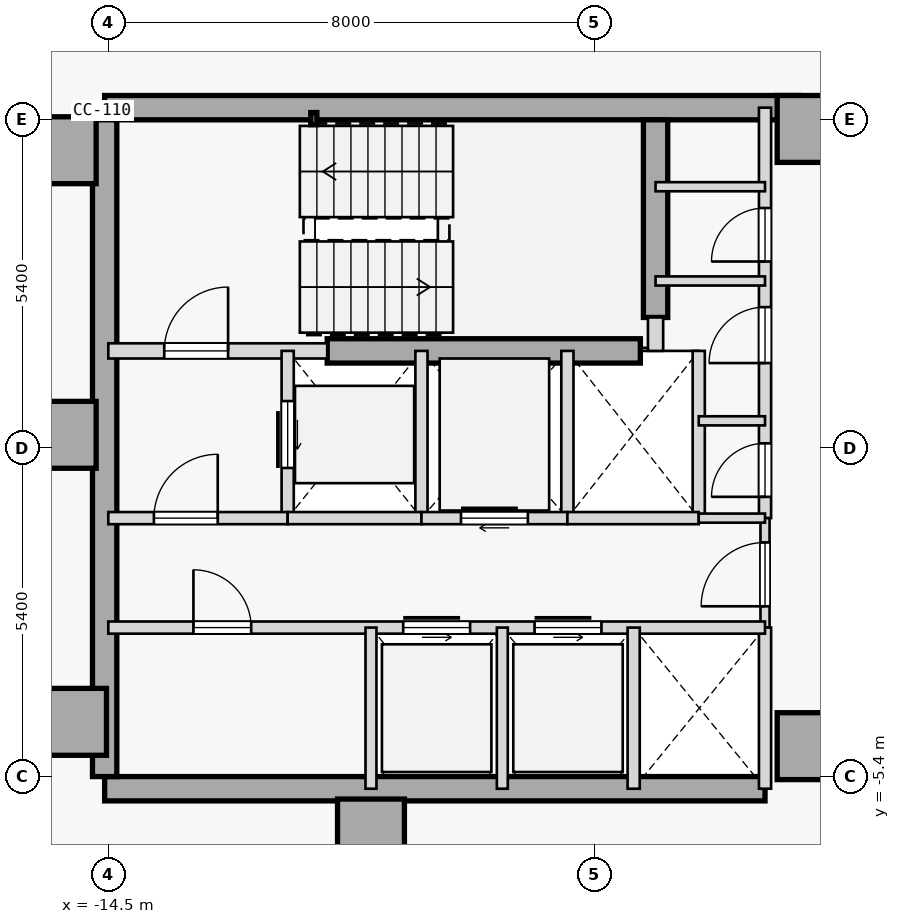
"""IFC4 building model, lengths in metres.
Left out: names, types, materials, properties, quantities, classifications, styles, units other than length and angle.
Written with IfcOpenShell. Run it as: python <this file> out.ifc"""

import sys

from ifc_helpers import new_model, si_unit, direction, frame, frame_2d, origin, origin_2d, place, context, subcontext, project, spatial, rectangle, hollow_rectangle, extrude, element, fill, save


model = new_model("IFC4")
c1 = context("Model", 3, precision=1e-05, world=origin(), true_north=direction((0.0, 1.0)))
c2 = subcontext(c1, "Body", "Model", "MODEL_VIEW")
j1 = project(units=[si_unit("LENGTHUNIT", "METRE"), si_unit("PLANEANGLEUNIT", "RADIAN")], contexts=[c1])
p1 = place(None, origin())
s1 = spatial("IfcSite", under=j1, at=p1, CompositionType="ELEMENT")
p2 = place(p1, origin())
s2 = spatial("IfcBuilding", under=s1, at=p2, CompositionType="ELEMENT")
p3 = place(p2, frame((0.0, 0.0, 192.2)))
s3 = spatial("IfcBuildingStorey", under=s2, at=p3, CompositionType="ELEMENT", Elevation=192.2)
for number, where, z_axis, x_axis in (
    (1, (-15.25, 4.9, 0.0), (0.0, 0.0, 1.0), (1.0, 0.0, 0.0)),
    (2, (-15.25, 0.22, 0.0), (0.0, 0.0, 1.0), (1.0, 0.0, 0.0)),
    (3, (-15.08, -4.5, 0.0), (0.0, 0.0, 1.0), (1.0, 0.0, 0.0)),
    (4, (-10.18, -6.32, 0.0), (0.0, 0.0, 1.0), (1.0, 0.0, 0.0)),
    (5, (-2.95, -4.9, 0.0), (0.0, 0.0, 1.0), (1.0, 0.0, 0.0)),
    (6, (-2.95, 5.25, 0.0), (0.0, 0.0, 1.0), (1.0, 0.0, 0.0)),
):
    element("IfcColumn", number, at=place(p3, frame(where, z_axis=z_axis, x_axis=x_axis)), inside=s3, PredefinedType="COLUMN", context=c2, shape_type="SweptSolid", body=[
        extrude(rectangle(XDim=1.1, YDim=1.1, at=origin_2d()), origin(), (0.0, 0.0, 1.0), 3.4),
    ])
p4 = place(p3, frame((-14.56, 5.6, 0.0), z_axis=(0.0, 0.0, 1.0), x_axis=(1.0, 0.0, 0.0)))
e7 = element("IfcWall", 7, at=p4, inside=s3, PredefinedType="SHEAR", context=c2, shape_type="SweptSolid", body=[
    extrude(rectangle(XDim=11.41, YDim=0.4, at=frame_2d((5.705, 0.0))), origin(), (0.0, 0.0, 1.0), 3.175),
])
p5 = place(p3, frame((-14.56, -5.6, 0.0), z_axis=(0.0, 0.0, 1.0), x_axis=(1.0, 0.0, 0.0)))
e8 = element("IfcWall", 8, at=p5, inside=s3, PredefinedType="SHEAR", context=c2, shape_type="SweptSolid", body=[
    extrude(rectangle(XDim=10.86, YDim=0.4, at=frame_2d((5.43, 0.0))), origin(), (0.0, 0.0, 1.0), 3.175),
])
p6 = place(p3, frame((-14.56, -5.4, 0.0), z_axis=(0.0, 0.0, 1.0), x_axis=(0.0, 1.0, 0.0)))
e9 = element("IfcWall", 9, at=p6, inside=s3, PredefinedType="SHEAR", context=c2, shape_type="SweptSolid", body=[
    extrude(rectangle(XDim=10.8, YDim=0.4, at=frame_2d((5.4, 0.0))), origin(), (0.0, 0.0, 1.0), 3.175),
])
p7 = place(p3, frame((-5.5, 2.15, 0.0), z_axis=(0.0, 0.0, 1.0), x_axis=(0.0, 1.0, 0.0)))
e10 = element("IfcWall", 10, at=p7, inside=s3, PredefinedType="SHEAR", context=c2, shape_type="SweptSolid", body=[
    extrude(rectangle(XDim=3.25, YDim=0.4, at=frame_2d((1.625, 0.0))), origin(), (0.0, 0.0, 1.0), 3.175),
])
p8 = place(p3, frame((-10.9, 1.6, 0.0), z_axis=(0.0, 0.0, 1.0), x_axis=(1.0, 0.0, 0.0)))
e11 = element("IfcWall", 11, at=p8, inside=s3, PredefinedType="SHEAR", context=c2, shape_type="SweptSolid", body=[
    extrude(rectangle(XDim=5.15, YDim=0.4, at=frame_2d((2.575, 0.0))), origin(), (0.0, 0.0, 1.0), 3.175),
])
p9 = place(p3, frame((-11.12, 5.42, 0.0), z_axis=(0.0, 0.0, 1.0), x_axis=(1.0, 0.0, 0.0)))
e12 = element("IfcColumn", 12, at=p9, inside=s3, PredefinedType="COLUMN", context=c2, shape_type="SweptSolid", body=[
    extrude(hollow_rectangle(XDim=0.1, YDim=0.2, WallThickness=0.008, at=origin_2d()), origin(), (0.0, 0.0, 1.0), 3.4),
])
p10 = place(p3, frame((-14.5, 1.6, 0.0), z_axis=(0.0, 0.0, 1.0), x_axis=(1.0, 0.0, 0.0)))
e13 = element("IfcWall", 13, at=p10, inside=s3, PredefinedType="STANDARD", context=c2, shape_type="SweptSolid", body=[
    extrude(rectangle(XDim=3.6, YDim=0.25, at=frame_2d((1.8, 0.0))), origin(), (0.0, 0.0, 1.0), 3.175),
])
p11 = place(p10, frame((0.92, 0.0, 0.0)))
e14 = element("IfcOpeningElement", 14, at=p11, cuts=e13, PredefinedType="OPENING", context=c2, shape_type="SweptSolid", body=[
    extrude(rectangle(XDim=1.05, YDim=2.15, at=frame_2d((0.525, 1.075))), frame((0.0, 0.135, 0.0), z_axis=(0.0, -1.0, 0.0), x_axis=(1.0, 0.0, 0.0)), (0.0, 0.0, 1.0), 0.27),
])
p12 = place(p3, frame((-5.5, 1.6, 0.0), z_axis=(0.0, 0.0, 1.0), x_axis=(0.0, 1.0, 0.0)))
e15 = element("IfcWall", 15, at=p12, inside=s3, PredefinedType="STANDARD", context=c2, shape_type="SweptSolid", body=[
    extrude(rectangle(XDim=0.55, YDim=0.25, at=frame_2d((0.275, 0.0))), origin(), (0.0, 0.0, 1.0), 3.175),
])
p13 = place(p3, frame((-3.7, -1.15, 0.0), z_axis=(0.0, 0.0, 1.0), x_axis=(0.0, 1.0, 0.0)))
e16 = element("IfcWall", 16, at=p13, inside=s3, PredefinedType="STANDARD", context=c2, shape_type="SweptSolid", body=[
    extrude(rectangle(XDim=6.75, YDim=0.2, at=frame_2d((3.375, 0.0))), origin(), (0.0, 0.0, 1.0), 3.175),
])
p14 = place(p13, frame((0.35, 0.0, 0.0)))
e17 = element("IfcOpeningElement", 17, at=p14, cuts=e16, PredefinedType="OPENING", context=c2, shape_type="SweptSolid", body=[
    extrude(rectangle(XDim=0.88, YDim=2.15, at=frame_2d((0.44, 1.075))), frame((0.0, 0.11, 0.0), z_axis=(0.0, -1.0, 0.0), x_axis=(1.0, 0.0, 0.0)), (0.0, 0.0, 1.0), 0.22),
])
p15 = place(p13, frame((2.55, 0.0, 0.0)))
e18 = element("IfcOpeningElement", 18, at=p15, cuts=e16, PredefinedType="OPENING", context=c2, shape_type="SweptSolid", body=[
    extrude(rectangle(XDim=0.92, YDim=2.15, at=frame_2d((0.46, 1.075))), frame((0.0, 0.11, 0.0), z_axis=(0.0, -1.0, 0.0), x_axis=(1.0, 0.0, 0.0)), (0.0, 0.0, 1.0), 0.22),
])
p16 = place(p13, frame((4.22, 0.0, 0.0)))
e19 = element("IfcOpeningElement", 19, at=p16, cuts=e16, PredefinedType="OPENING", context=c2, shape_type="SweptSolid", body=[
    extrude(rectangle(XDim=0.88, YDim=2.15, at=frame_2d((0.44, 1.075))), frame((0.0, 0.11, 0.0), z_axis=(0.0, -1.0, 0.0), x_axis=(1.0, 0.0, 0.0)), (0.0, 0.0, 1.0), 0.22),
])
p17 = place(p3, frame((-3.7, -2.95, 0.0), z_axis=(0.0, 0.0, 1.0), x_axis=(0.0, 1.0, 0.0)))
e20 = element("IfcWall", 20, at=p17, inside=s3, PredefinedType="PARTITIONING", context=c2, shape_type="SweptSolid", body=[
    extrude(rectangle(XDim=1.8, YDim=0.15, at=frame_2d((0.9, 0.0))), origin(), (0.0, 0.0, 1.0), 3.175),
])
p18 = place(p17, frame((0.35, 0.0, 0.0)))
e21 = element("IfcOpeningElement", 21, at=p18, cuts=e20, PredefinedType="OPENING", context=c2, shape_type="SweptSolid", body=[
    extrude(rectangle(XDim=1.05, YDim=2.18, at=frame_2d((0.525, 1.09))), frame((0.0, 0.085, 0.0), z_axis=(0.0, -1.0, 0.0), x_axis=(1.0, 0.0, 0.0)), (0.0, 0.0, 1.0), 0.17),
])
p19 = place(p3, frame((-3.7, -5.6, 0.0), z_axis=(0.0, 0.0, 1.0), x_axis=(0.0, 1.0, 0.0)))
e22 = element("IfcWall", 22, at=p19, inside=s3, PredefinedType="STANDARD", context=c2, shape_type="SweptSolid", body=[
    extrude(rectangle(XDim=2.65, YDim=0.2, at=frame_2d((1.325, 0.0))), origin(), (0.0, 0.0, 1.0), 3.175),
])
p20 = place(p3, frame((-11.55, -1.15, 0.0), z_axis=(0.0, 0.0, 1.0), x_axis=(0.0, 1.0, 0.0)))
e23 = element("IfcWall", 23, at=p20, inside=s3, PredefinedType="STANDARD", context=c2, shape_type="SweptSolid", body=[
    extrude(rectangle(XDim=2.75, YDim=0.2, at=frame_2d((1.375, 0.0))), origin(), (0.0, 0.0, 1.0), 3.175),
])
p21 = place(p20, frame((0.825, 0.0, 0.0)))
e24 = element("IfcOpeningElement", 24, at=p21, cuts=e23, PredefinedType="OPENING", context=c2, shape_type="SweptSolid", body=[
    extrude(rectangle(XDim=1.1, YDim=2.15, at=frame_2d((0.55, 1.075))), frame((0.0, 0.11, 0.0), z_axis=(0.0, -1.0, 0.0), x_axis=(1.0, 0.0, 0.0)), (0.0, 0.0, 1.0), 0.22),
])
p22 = place(p3, frame((-9.35, -1.15, 0.0), z_axis=(0.0, 0.0, 1.0), x_axis=(0.0, 1.0, 0.0)))
e25 = element("IfcWall", 25, at=p22, inside=s3, PredefinedType="STANDARD", context=c2, shape_type="SweptSolid", body=[
    extrude(rectangle(XDim=2.75, YDim=0.2, at=frame_2d((1.375, 0.0))), origin(), (0.0, 0.0, 1.0), 3.175),
])
p23 = place(p3, frame((-14.5, -1.15, 0.0), z_axis=(0.0, 0.0, 1.0), x_axis=(1.0, 0.0, 0.0)))
e26 = element("IfcWall", 26, at=p23, inside=s3, PredefinedType="STANDARD", context=c2, shape_type="SweptSolid", body=[
    extrude(rectangle(XDim=2.95, YDim=0.2, at=frame_2d((1.475, 0.0))), origin(), (0.0, 0.0, 1.0), 3.175),
])
p24 = place(p23, frame((0.75, 0.0, 0.0)))
e27 = element("IfcOpeningElement", 27, at=p24, cuts=e26, PredefinedType="OPENING", context=c2, shape_type="SweptSolid", body=[
    extrude(rectangle(XDim=1.05, YDim=2.18, at=frame_2d((0.525, 1.09))), frame((0.0, 0.11, 0.0), z_axis=(0.0, -1.0, 0.0), x_axis=(1.0, 0.0, 0.0)), (0.0, 0.0, 1.0), 0.22),
])
p25 = place(p3, frame((-11.55, -1.15, 0.0), z_axis=(0.0, 0.0, 1.0), x_axis=(1.0, 0.0, 0.0)))
e28 = element("IfcWall", 28, at=p25, inside=s3, PredefinedType="STANDARD", context=c2, shape_type="SweptSolid", body=[
    extrude(rectangle(XDim=2.2, YDim=0.2, at=frame_2d((1.1, 0.0))), origin(), (0.0, 0.0, 1.0), 3.175),
])
p26 = place(p3, frame((-6.95, -1.15, 0.0), z_axis=(0.0, 0.0, 1.0), x_axis=(0.0, 1.0, 0.0)))
e29 = element("IfcWall", 29, at=p26, inside=s3, PredefinedType="STANDARD", context=c2, shape_type="SweptSolid", body=[
    extrude(rectangle(XDim=2.75, YDim=0.2, at=frame_2d((1.375, 0.0))), origin(), (0.0, 0.0, 1.0), 3.175),
])
p27 = place(p3, frame((-9.35, -1.15, 0.0), z_axis=(0.0, 0.0, 1.0), x_axis=(1.0, 0.0, 0.0)))
e30 = element("IfcWall", 30, at=p27, inside=s3, PredefinedType="STANDARD", context=c2, shape_type="SweptSolid", body=[
    extrude(rectangle(XDim=2.4, YDim=0.2, at=frame_2d((1.2, 0.0))), origin(), (0.0, 0.0, 1.0), 3.175),
])
p28 = place(p27, frame((0.65, 0.0, 0.0)))
e31 = element("IfcOpeningElement", 31, at=p28, cuts=e30, PredefinedType="OPENING", context=c2, shape_type="SweptSolid", body=[
    extrude(rectangle(XDim=1.1, YDim=2.15, at=frame_2d((0.55, 1.075))), frame((0.0, 0.11, 0.0), z_axis=(0.0, -1.0, 0.0), x_axis=(1.0, 0.0, 0.0)), (0.0, 0.0, 1.0), 0.22),
])
p29 = place(p3, frame((-4.79, -1.15, 0.0), z_axis=(0.0, 0.0, 1.0), x_axis=(0.0, 1.0, 0.0)))
e32 = element("IfcWall", 32, at=p29, inside=s3, PredefinedType="STANDARD", context=c2, shape_type="SweptSolid", body=[
    extrude(rectangle(XDim=2.75, YDim=0.2, at=frame_2d((1.375, 0.0))), origin(), (0.0, 0.0, 1.0), 3.175),
])
p30 = place(p3, frame((-6.95, -1.15, 0.0), z_axis=(0.0, 0.0, 1.0), x_axis=(1.0, 0.0, 0.0)))
e33 = element("IfcWall", 33, at=p30, inside=s3, PredefinedType="STANDARD", context=c2, shape_type="SweptSolid", body=[
    extrude(rectangle(XDim=2.16, YDim=0.2, at=frame_2d((1.08, 0.0))), origin(), (0.0, 0.0, 1.0), 3.175),
])
p31 = place(p3, frame((-4.79, -1.15, 0.0), z_axis=(0.0, 0.0, 1.0), x_axis=(1.0, 0.0, 0.0)))
e34 = element("IfcWall", 34, at=p31, inside=s3, PredefinedType="PARTITIONING", context=c2, shape_type="SweptSolid", body=[
    extrude(rectangle(XDim=1.09, YDim=0.15, at=frame_2d((0.545, 0.0))), origin(), (0.0, 0.0, 1.0), 3.175),
])
p32 = place(p3, frame((-14.5, -2.95, 0.0), z_axis=(0.0, 0.0, 1.0), x_axis=(1.0, 0.0, 0.0)))
e35 = element("IfcWall", 35, at=p32, inside=s3, PredefinedType="STANDARD", context=c2, shape_type="SweptSolid", body=[
    extrude(rectangle(XDim=10.8, YDim=0.2, at=frame_2d((5.4, 0.0))), origin(), (0.0, 0.0, 1.0), 3.175),
])
p33 = place(p32, frame((4.85, 0.0, 0.0)))
e36 = element("IfcOpeningElement", 36, at=p33, cuts=e35, PredefinedType="OPENING", context=c2, shape_type="SweptSolid", body=[
    extrude(rectangle(XDim=1.1, YDim=2.15, at=frame_2d((0.55, 1.075))), frame((0.0, 0.11, 0.0), z_axis=(0.0, -1.0, 0.0), x_axis=(1.0, 0.0, 0.0)), (0.0, 0.0, 1.0), 0.22),
])
p34 = place(p32, frame((7.01, 0.0, 0.0)))
e37 = element("IfcOpeningElement", 37, at=p34, cuts=e35, PredefinedType="OPENING", context=c2, shape_type="SweptSolid", body=[
    extrude(rectangle(XDim=1.1, YDim=2.15, at=frame_2d((0.55, 1.075))), frame((0.0, 0.11, 0.0), z_axis=(0.0, -1.0, 0.0), x_axis=(1.0, 0.0, 0.0)), (0.0, 0.0, 1.0), 0.22),
])
p35 = place(p32, frame((1.4, 0.0, 0.0)))
e38 = element("IfcOpeningElement", 38, at=p35, cuts=e35, PredefinedType="OPENING", context=c2, shape_type="SweptSolid", body=[
    extrude(rectangle(XDim=0.95, YDim=2.15, at=frame_2d((0.475, 1.075))), frame((0.0, 0.11, 0.0), z_axis=(0.0, -1.0, 0.0), x_axis=(1.0, 0.0, 0.0)), (0.0, 0.0, 1.0), 0.22),
])
p36 = place(p3, frame((-5.86, -5.6, 0.0), z_axis=(0.0, 0.0, 1.0), x_axis=(0.0, 1.0, 0.0)))
e39 = element("IfcWall", 39, at=p36, inside=s3, PredefinedType="STANDARD", context=c2, shape_type="SweptSolid", body=[
    extrude(rectangle(XDim=2.65, YDim=0.2, at=frame_2d((1.325, 0.0))), origin(), (0.0, 0.0, 1.0), 3.175),
])
for number, where, z_axis, x_axis in (
    (40, (-10.18, -5.6, 0.0), (0.0, 0.0, 1.0), (0.0, 1.0, 0.0)),
    (41, (-8.02, -5.6, 0.0), (0.0, 0.0, 1.0), (0.0, 1.0, 0.0)),
):
    element("IfcWall", number, at=place(p3, frame(where, z_axis=z_axis, x_axis=x_axis)), inside=s3, PredefinedType="STANDARD", context=c2, shape_type="SweptSolid", body=[
        extrude(rectangle(XDim=2.65, YDim=0.18, at=frame_2d((1.325, 0.0))), origin(), (0.0, 0.0, 1.0), 3.175),
    ])
p37 = place(p3, frame((-5.5, 4.3, 0.0), z_axis=(0.0, 0.0, 1.0), x_axis=(1.0, 0.0, 0.0)))
e42 = element("IfcWall", 42, at=p37, inside=s3, PredefinedType="PARTITIONING", context=c2, shape_type="SweptSolid", body=[
    extrude(rectangle(XDim=1.8, YDim=0.15, at=frame_2d((0.9, 0.0))), origin(), (0.0, 0.0, 1.0), 3.175),
])
p38 = place(p3, frame((-4.79, 0.45, 0.0), z_axis=(0.0, 0.0, 1.0), x_axis=(1.0, 0.0, 0.0)))
e43 = element("IfcWall", 43, at=p38, inside=s3, PredefinedType="PARTITIONING", context=c2, shape_type="SweptSolid", body=[
    extrude(rectangle(XDim=1.09, YDim=0.15, at=frame_2d((0.545, 0.0))), origin(), (0.0, 0.0, 1.0), 3.175),
])
p39 = place(p3, frame((-5.5, 2.75, 0.0), z_axis=(0.0, 0.0, 1.0), x_axis=(1.0, 0.0, 0.0)))
e44 = element("IfcWall", 44, at=p39, inside=s3, PredefinedType="PARTITIONING", context=c2, shape_type="SweptSolid", body=[
    extrude(rectangle(XDim=1.8, YDim=0.15, at=frame_2d((0.9, 0.0))), origin(), (0.0, 0.0, 1.0), 3.175),
])
p40 = place(p11, origin())
e45 = element("IfcDoor", 45, at=p40, inside=s3, OperationType="SINGLE_SWING_RIGHT", PredefinedType="DOOR", context=c2, shape_type="SweptSolid", body=[
    extrude(rectangle(XDim=1.05, YDim=2.15, at=frame_2d((0.525, 1.075))), frame((0.0, 0.025, 0.0), z_axis=(0.0, -1.0, 0.0), x_axis=(1.0, 0.0, 0.0)), (0.0, 0.0, 1.0), 0.05),
])
fill(e14, e45)
p41 = place(p24, origin())
e46 = element("IfcDoor", 46, at=p41, inside=s3, OperationType="SINGLE_SWING_RIGHT", PredefinedType="DOOR", context=c2, shape_type="SweptSolid", body=[
    extrude(rectangle(XDim=1.05, YDim=2.18, at=frame_2d((0.525, 1.09))), frame((0.0, 0.025, 0.0), z_axis=(0.0, -1.0, 0.0), x_axis=(1.0, 0.0, 0.0)), (0.0, 0.0, 1.0), 0.05),
])
fill(e27, e46)
p42 = place(p18, origin())
e47 = element("IfcDoor", 47, at=p42, inside=s3, OperationType="SINGLE_SWING_LEFT", PredefinedType="DOOR", context=c2, shape_type="SweptSolid", body=[
    extrude(rectangle(XDim=1.05, YDim=2.18, at=frame_2d((0.525, 1.09))), frame((0.0, 0.025, 0.0), z_axis=(0.0, -1.0, 0.0), x_axis=(1.0, 0.0, 0.0)), (0.0, 0.0, 1.0), 0.05),
])
fill(e21, e47)
p43 = place(p21, origin())
e48 = element("IfcDoor", 48, at=p43, inside=s3, OperationType="SLIDING_TO_RIGHT", PredefinedType="DOOR", context=c2, shape_type="SweptSolid", body=[
    extrude(rectangle(XDim=1.1, YDim=2.15, at=frame_2d((0.55, 1.075))), frame((0.0, 0.025, 0.0), z_axis=(0.0, -1.0, 0.0), x_axis=(1.0, 0.0, 0.0)), (0.0, 0.0, 1.0), 0.05),
])
fill(e24, e48)
p44 = place(p28, origin())
e49 = element("IfcDoor", 49, at=p44, inside=s3, OperationType="SLIDING_TO_RIGHT", PredefinedType="DOOR", context=c2, shape_type="SweptSolid", body=[
    extrude(rectangle(XDim=1.1, YDim=2.15, at=frame_2d((0.55, 1.075))), frame((0.0, 0.025, 0.0), z_axis=(0.0, -1.0, 0.0), x_axis=(1.0, 0.0, 0.0)), (0.0, 0.0, 1.0), 0.05),
])
fill(e31, e49)
p45 = place(p33, origin())
e50 = element("IfcDoor", 50, at=p45, inside=s3, OperationType="SLIDING_TO_LEFT", PredefinedType="DOOR", context=c2, shape_type="SweptSolid", body=[
    extrude(rectangle(XDim=1.1, YDim=2.15, at=frame_2d((0.55, 1.075))), frame((0.0, 0.025, 0.0), z_axis=(0.0, -1.0, 0.0), x_axis=(1.0, 0.0, 0.0)), (0.0, 0.0, 1.0), 0.05),
])
fill(e36, e50)
p46 = place(p34, origin())
e51 = element("IfcDoor", 51, at=p46, inside=s3, OperationType="SLIDING_TO_LEFT", PredefinedType="DOOR", context=c2, shape_type="SweptSolid", body=[
    extrude(rectangle(XDim=1.1, YDim=2.15, at=frame_2d((0.55, 1.075))), frame((0.0, 0.025, 0.0), z_axis=(0.0, -1.0, 0.0), x_axis=(1.0, 0.0, 0.0)), (0.0, 0.0, 1.0), 0.05),
])
fill(e37, e51)
p47 = place(p35, origin())
e52 = element("IfcDoor", 52, at=p47, inside=s3, OperationType="SINGLE_SWING_LEFT", PredefinedType="DOOR", context=c2, shape_type="SweptSolid", body=[
    extrude(rectangle(XDim=0.95, YDim=2.15, at=frame_2d((0.475, 1.075))), frame((0.0, 0.025, 0.0), z_axis=(0.0, -1.0, 0.0), x_axis=(1.0, 0.0, 0.0)), (0.0, 0.0, 1.0), 0.05),
])
fill(e38, e52)
p48 = place(p14, origin())
e53 = element("IfcDoor", 53, at=p48, inside=s3, OperationType="SINGLE_SWING_LEFT", PredefinedType="DOOR", context=c2, shape_type="SweptSolid", body=[
    extrude(rectangle(XDim=0.88, YDim=2.15, at=frame_2d((0.44, 1.075))), frame((0.0, 0.025, 0.0), z_axis=(0.0, -1.0, 0.0), x_axis=(1.0, 0.0, 0.0)), (0.0, 0.0, 1.0), 0.05),
])
fill(e17, e53)
p49 = place(p15, origin())
e54 = element("IfcDoor", 54, at=p49, inside=s3, OperationType="SINGLE_SWING_LEFT", PredefinedType="DOOR", context=c2, shape_type="SweptSolid", body=[
    extrude(rectangle(XDim=0.92, YDim=2.15, at=frame_2d((0.46, 1.075))), frame((0.0, 0.025, 0.0), z_axis=(0.0, -1.0, 0.0), x_axis=(1.0, 0.0, 0.0)), (0.0, 0.0, 1.0), 0.05),
])
fill(e18, e54)
p50 = place(p16, origin())
e55 = element("IfcDoor", 55, at=p50, inside=s3, OperationType="SINGLE_SWING_LEFT", PredefinedType="DOOR", context=c2, shape_type="SweptSolid", body=[
    extrude(rectangle(XDim=0.88, YDim=2.15, at=frame_2d((0.44, 1.075))), frame((0.0, 0.025, 0.0), z_axis=(0.0, -1.0, 0.0), x_axis=(1.0, 0.0, 0.0)), (0.0, 0.0, 1.0), 0.05),
])
fill(e19, e55)
save(model, sys.argv[1])
